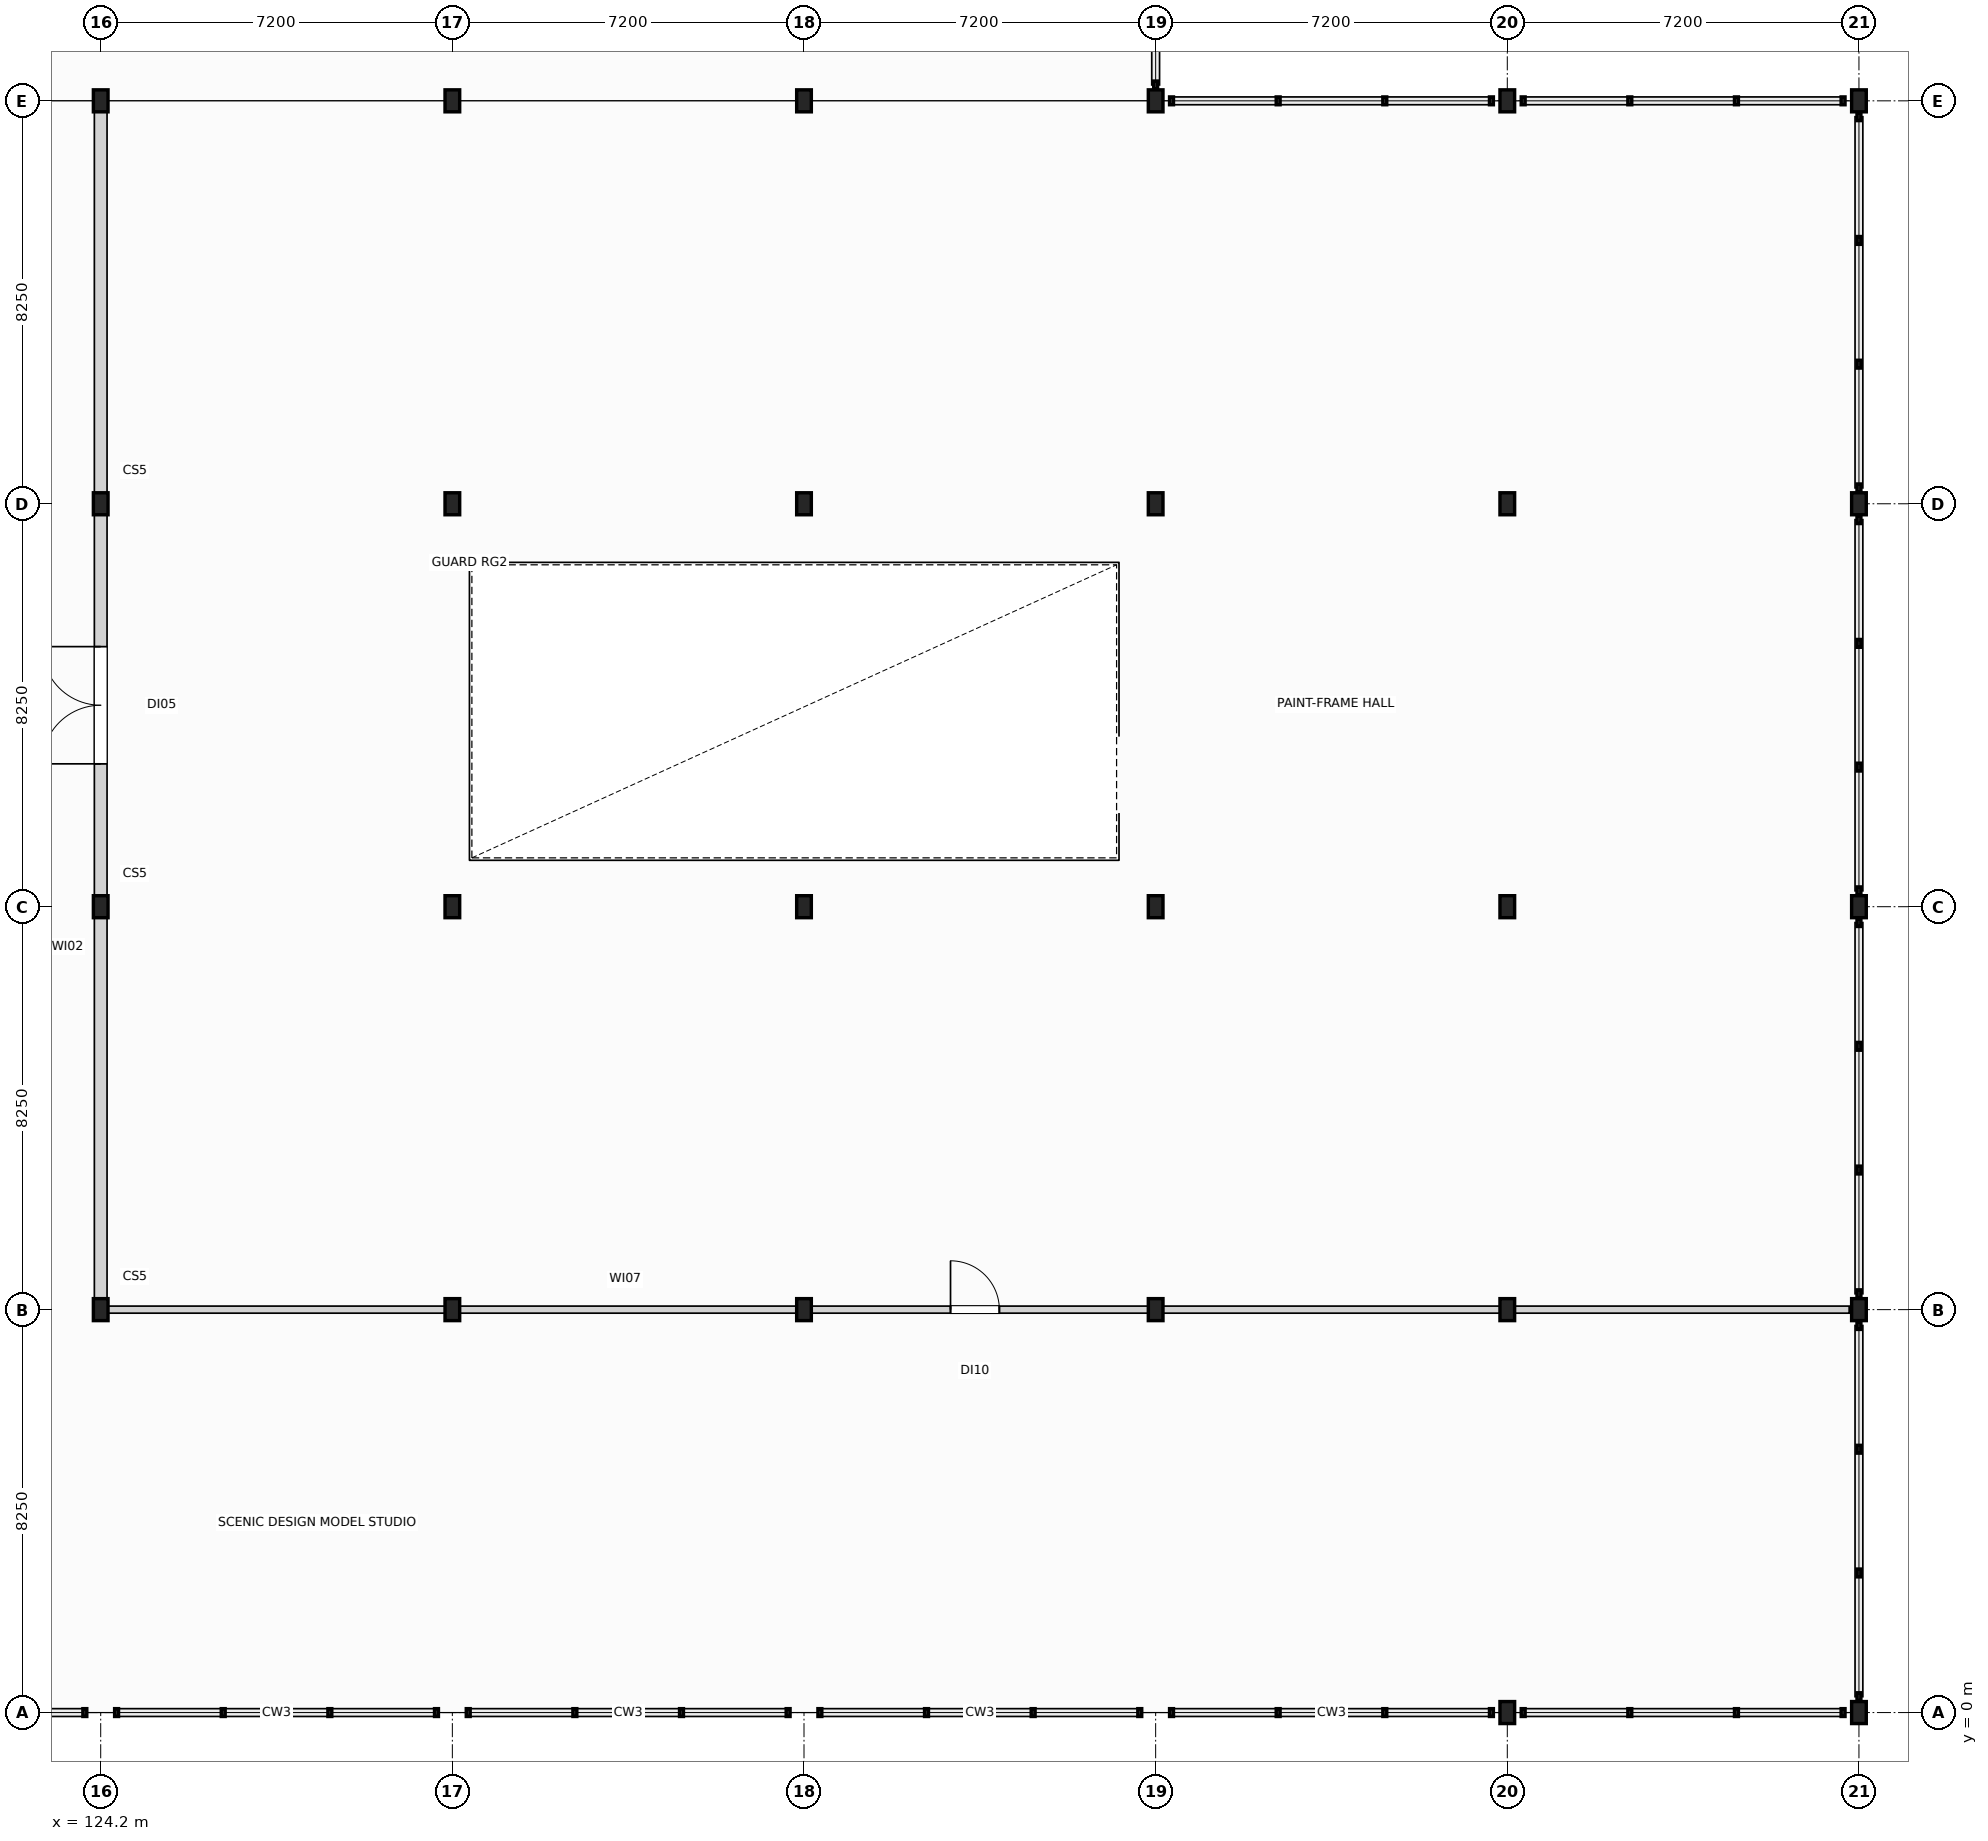
"""IFC4 building model, lengths in metres.
Left out: names, types, materials, properties, quantities, classifications, styles, units other than length and angle.
Written with IfcOpenShell. Run it as: python <this file> out.ifc"""

import sys

from ifc_helpers import new_model, si_unit, direction, frame, frame_2d, origin, origin_2d, place, context, subcontext, project, spatial, rectangle, i_section, extrude, element, fill, save


model = new_model("IFC4")
c1 = context("Model", 3, precision=1e-05, world=origin(), true_north=direction((0.0, 1.0)))
c2 = subcontext(c1, "Body", "Model", "MODEL_VIEW")
j1 = project(units=[si_unit("LENGTHUNIT", "METRE"), si_unit("PLANEANGLEUNIT", "RADIAN")], contexts=[c1])
p1 = place(None, origin())
s1 = spatial("IfcSite", under=j1, at=p1, CompositionType="ELEMENT")
p2 = place(p1, origin())
s2 = spatial("IfcBuilding", under=s1, at=p2, CompositionType="ELEMENT")
p3 = place(p2, frame((0.0, 0.0, 6.0)))
s3 = spatial("IfcBuildingStorey", under=s2, at=p3, CompositionType="ELEMENT", Elevation=6.0)
for number, where, z_axis, x_axis in (
    (1, (124.2, 8.25, 0.0), (0.0, 0.0, 1.0), (1.0, 0.0, 0.0)),
    (2, (124.2, 16.5, 0.0), (0.0, 0.0, 1.0), (1.0, 0.0, 0.0)),
    (3, (124.2, 24.75, 0.0), (0.0, 0.0, 1.0), (1.0, 0.0, 0.0)),
    (4, (124.2, 33.0, 0.0), (0.0, 0.0, 1.0), (1.0, 0.0, 0.0)),
    (5, (131.4, 8.25, 0.0), (0.0, 0.0, 1.0), (1.0, 0.0, 0.0)),
    (6, (131.4, 16.5, 0.0), (0.0, 0.0, 1.0), (1.0, 0.0, 0.0)),
    (7, (131.4, 24.75, 0.0), (0.0, 0.0, 1.0), (1.0, 0.0, 0.0)),
    (8, (131.4, 33.0, 0.0), (0.0, 0.0, 1.0), (1.0, 0.0, 0.0)),
    (9, (138.6, 8.25, 0.0), (0.0, 0.0, 1.0), (1.0, 0.0, 0.0)),
    (10, (138.6, 16.5, 0.0), (0.0, 0.0, 1.0), (1.0, 0.0, 0.0)),
    (11, (138.6, 24.75, 0.0), (0.0, 0.0, 1.0), (1.0, 0.0, 0.0)),
    (12, (138.6, 33.0, 0.0), (0.0, 0.0, 1.0), (1.0, 0.0, 0.0)),
    (13, (145.8, 8.25, 0.0), (0.0, 0.0, 1.0), (1.0, 0.0, 0.0)),
    (14, (145.8, 16.5, 0.0), (0.0, 0.0, 1.0), (1.0, 0.0, 0.0)),
    (15, (145.8, 24.75, 0.0), (0.0, 0.0, 1.0), (1.0, 0.0, 0.0)),
    (16, (145.8, 33.0, 0.0), (0.0, 0.0, 1.0), (1.0, 0.0, 0.0)),
    (17, (153.0, 0.0, 0.0), (0.0, 0.0, 1.0), (1.0, 0.0, 0.0)),
    (18, (153.0, 8.25, 0.0), (0.0, 0.0, 1.0), (1.0, 0.0, 0.0)),
    (19, (153.0, 16.5, 0.0), (0.0, 0.0, 1.0), (1.0, 0.0, 0.0)),
    (20, (153.0, 24.75, 0.0), (0.0, 0.0, 1.0), (1.0, 0.0, 0.0)),
    (21, (153.0, 33.0, 0.0), (0.0, 0.0, 1.0), (1.0, 0.0, 0.0)),
    (22, (160.2, 0.0, 0.0), (0.0, 0.0, 1.0), (1.0, 0.0, 0.0)),
    (23, (160.2, 8.25, 0.0), (0.0, 0.0, 1.0), (1.0, 0.0, 0.0)),
    (24, (160.2, 16.5, 0.0), (0.0, 0.0, 1.0), (1.0, 0.0, 0.0)),
    (25, (160.2, 24.75, 0.0), (0.0, 0.0, 1.0), (1.0, 0.0, 0.0)),
    (26, (160.2, 33.0, 0.0), (0.0, 0.0, 1.0), (1.0, 0.0, 0.0)),
):
    element("IfcColumn", number, at=place(p3, frame(where, z_axis=z_axis, x_axis=x_axis)), inside=s3, PredefinedType="COLUMN", context=c2, shape_type="SweptSolid", body=[
        extrude(i_section(OverallWidth=0.3, OverallDepth=0.45, WebThickness=0.014, FlangeThickness=0.026, at=origin_2d()), origin(), (0.0, 0.0, 1.0), 5.4),
    ])
p4 = place(p3, frame((124.2, 8.25, 0.0), z_axis=(0.0, 0.0, 1.0), x_axis=(0.0, 1.0, 0.0)))
e27 = element("IfcWall", 27, at=p4, inside=s3, PredefinedType="PARTITIONING", context=c2, shape_type="SweptSolid", body=[
    extrude(rectangle(XDim=24.75, YDim=0.26, at=frame_2d((12.375, 0.0))), origin(), (0.0, 0.0, 1.0), 4.065),
])
p5 = place(p4, frame((11.175, 0.0, 0.0)))
e28 = element("IfcOpeningElement", 28, at=p5, cuts=e27, PredefinedType="OPENING", context=c2, shape_type="SweptSolid", body=[
    extrude(rectangle(XDim=2.4, YDim=2.65, at=frame_2d((1.2, 1.325))), frame((0.0, 0.14, 0.0), z_axis=(0.0, -1.0, 0.0), x_axis=(1.0, 0.0, 0.0)), (0.0, 0.0, 1.0), 0.28),
])
p6 = place(p3, frame((124.2, 8.25, 0.0), z_axis=(0.0, 0.0, 1.0), x_axis=(1.0, 0.0, 0.0)))
e29 = element("IfcWall", 29, at=p6, inside=s3, PredefinedType="PARTITIONING", context=c2, shape_type="SweptSolid", body=[
    extrude(rectangle(XDim=35.8, YDim=0.145, at=frame_2d((17.9, 0.0))), origin(), (0.0, 0.0, 1.0), 4.185),
])
p7 = place(p6, frame((17.4, 0.0, 0.0)))
e30 = element("IfcOpeningElement", 30, at=p7, cuts=e29, PredefinedType="OPENING", context=c2, shape_type="SweptSolid", body=[
    extrude(rectangle(XDim=1.0, YDim=2.12, at=frame_2d((0.5, 1.06))), frame((0.0, 0.083, 0.0), z_axis=(0.0, -1.0, 0.0), x_axis=(1.0, 0.0, 0.0)), (0.0, 0.0, 1.0), 0.165),
])
p8 = place(p5, origin())
e31 = element("IfcDoor", 31, at=p8, inside=s3, OperationType="DOUBLE_DOOR_SINGLE_SWING", PredefinedType="DOOR", context=c2, shape_type="SweptSolid", body=[
    extrude(rectangle(XDim=2.4, YDim=2.65, at=frame_2d((1.2, 1.325))), frame((0.0, 0.025, 0.0), z_axis=(0.0, -1.0, 0.0), x_axis=(1.0, 0.0, 0.0)), (0.0, 0.0, 1.0), 0.05),
])
fill(e28, e31)
p9 = place(p7, origin())
e32 = element("IfcDoor", 32, at=p9, inside=s3, OperationType="SINGLE_SWING_LEFT", PredefinedType="DOOR", context=c2, shape_type="SweptSolid", body=[
    extrude(rectangle(XDim=1.0, YDim=2.12, at=frame_2d((0.5, 1.06))), frame((0.0, 0.025, 0.0), z_axis=(0.0, -1.0, 0.0), x_axis=(1.0, 0.0, 0.0)), (0.0, 0.0, 1.0), 0.05),
])
fill(e30, e32)
save(model, sys.argv[1])
